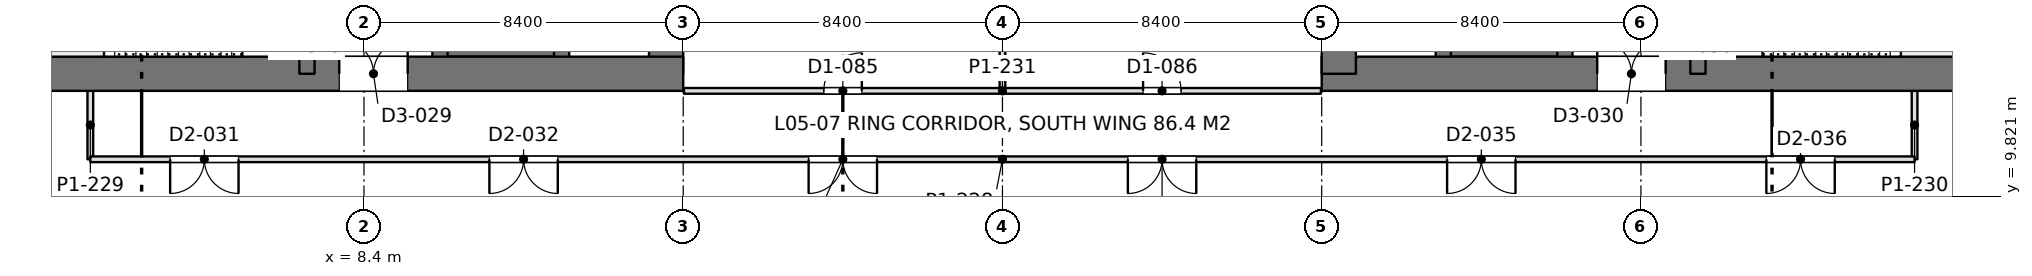
"""IFC4 building model, lengths in metres.
Left out: names, types, materials, properties, quantities, classifications, styles, units other than length and angle.
Written with IfcOpenShell. Run it as: python <this file> out.ifc"""

import sys

from ifc_helpers import new_model, si_unit, direction, frame, frame_2d, origin, place, context, subcontext, project, spatial, rectangle, extrude, element, fill, save


model = new_model("IFC4")
c1 = context("Model", 3, precision=1e-05, world=origin(), true_north=direction((0.0, 1.0)))
c2 = subcontext(c1, "Body", "Model", "MODEL_VIEW")
j1 = project(units=[si_unit("LENGTHUNIT", "METRE"), si_unit("PLANEANGLEUNIT", "RADIAN")], contexts=[c1])
p1 = place(None, origin())
s1 = spatial("IfcSite", under=j1, at=p1, CompositionType="ELEMENT")
p2 = place(p1, origin())
s2 = spatial("IfcBuilding", under=s1, at=p2, CompositionType="ELEMENT")
p3 = place(p2, frame((0.0, 0.0, 23.4)))
s3 = spatial("IfcBuildingStorey", under=s2, at=p3, CompositionType="ELEMENT", Elevation=23.4)
p4 = place(p3, frame((-1.2, 13.05, 0.0), z_axis=(0.0, 0.0, 1.0), x_axis=(1.0, 0.0, 0.0)))
e1 = element("IfcWall", 1, at=p4, inside=s3, PredefinedType="SHEAR", context=c2, shape_type="SweptSolid", body=[
    extrude(rectangle(XDim=18.0, YDim=0.9, at=frame_2d((9.0, 0.0))), origin(), (0.0, 0.0, 1.0), 4.5),
])
p5 = place(p4, frame((8.95, 0.0, 0.0)))
e2 = element("IfcOpeningElement", 2, at=p5, cuts=e1, PredefinedType="OPENING", context=c2, shape_type="SweptSolid", body=[
    extrude(rectangle(XDim=1.8, YDim=2.4, at=frame_2d((0.9, 1.2))), frame((0.0, 0.46, 0.0), z_axis=(0.0, -1.0, 0.0), x_axis=(1.0, 0.0, 0.0)), (0.0, 0.0, 1.0), 0.92),
])
p6 = place(p3, frame((16.35, 13.05, 0.0), z_axis=(0.0, 0.0, 1.0), x_axis=(0.0, 1.0, 0.0)))
e3 = element("IfcWall", 3, at=p6, inside=s3, PredefinedType="SHEAR", context=c2, shape_type="SweptSolid", body=[
    extrude(rectangle(XDim=24.3, YDim=0.9, at=frame_2d((12.15, 0.0))), origin(), (0.0, 0.0, 1.0), 4.5),
])
p7 = place(p3, frame((6.9, 13.05, 0.0), z_axis=(0.0, 0.0, 1.0), x_axis=(0.0, 1.0, 0.0)))
e4 = element("IfcWall", 4, at=p7, inside=s3, PredefinedType="SHEAR", context=c2, shape_type="SweptSolid", body=[
    extrude(rectangle(XDim=24.3, YDim=0.4, at=frame_2d((12.15, 0.0))), origin(), (0.0, 0.0, 1.0), 4.5),
])
p8 = place(p7, frame((1.3, 0.0, 0.0)))
e5 = element("IfcOpeningElement", 5, at=p8, cuts=e4, PredefinedType="OPENING", context=c2, shape_type="SweptSolid", body=[
    extrude(rectangle(XDim=1.0, YDim=2.2, at=frame_2d((0.5, 1.1))), frame((0.0, 0.21, 0.0), z_axis=(0.0, -1.0, 0.0), x_axis=(1.0, 0.0, 0.0)), (0.0, 0.0, 1.0), 0.42),
])
p9 = place(p7, frame((22.0, 0.0, 0.0)))
e6 = element("IfcOpeningElement", 6, at=p9, cuts=e4, PredefinedType="OPENING", context=c2, shape_type="SweptSolid", body=[
    extrude(rectangle(XDim=1.0, YDim=2.2, at=frame_2d((0.5, 1.1))), frame((0.0, 0.21, 0.0), z_axis=(0.0, -1.0, 0.0), x_axis=(1.0, 0.0, 0.0)), (0.0, 0.0, 1.0), 0.42),
])
p10 = place(p7, frame((5.55, 0.0, 0.0)))
e7 = element("IfcOpeningElement", 7, at=p10, cuts=e4, PredefinedType="OPENING", context=c2, shape_type="SweptSolid", body=[
    extrude(rectangle(XDim=1.0, YDim=2.2, at=frame_2d((0.5, 1.1))), frame((0.0, 0.21, 0.0), z_axis=(0.0, -1.0, 0.0), x_axis=(1.0, 0.0, 0.0)), (0.0, 0.0, 1.0), 0.42),
])
p11 = place(p7, frame((9.55, 0.0, 0.0)))
e8 = element("IfcOpeningElement", 8, at=p11, cuts=e4, PredefinedType="OPENING", context=c2, shape_type="SweptSolid", body=[
    extrude(rectangle(XDim=1.0, YDim=2.2, at=frame_2d((0.5, 1.1))), frame((0.0, 0.21, 0.0), z_axis=(0.0, -1.0, 0.0), x_axis=(1.0, 0.0, 0.0)), (0.0, 0.0, 1.0), 0.42),
])
p12 = place(p7, frame((12.8, 0.0, 0.0)))
e9 = element("IfcOpeningElement", 9, at=p12, cuts=e4, PredefinedType="OPENING", context=c2, shape_type="SweptSolid", body=[
    extrude(rectangle(XDim=1.1, YDim=2.2, at=frame_2d((0.55, 1.1))), frame((0.0, 0.21, 0.0), z_axis=(0.0, -1.0, 0.0), x_axis=(1.0, 0.0, 0.0)), (0.0, 0.0, 1.0), 0.42),
])
p13 = place(p7, frame((15.538, 0.0, 0.0)))
e10 = element("IfcOpeningElement", 10, at=p13, cuts=e4, PredefinedType="OPENING", context=c2, shape_type="SweptSolid", body=[
    extrude(rectangle(XDim=1.1, YDim=2.2, at=frame_2d((0.55, 1.1))), frame((0.0, 0.21, 0.0), z_axis=(0.0, -1.0, 0.0), x_axis=(1.0, 0.0, 0.0)), (0.0, 0.0, 1.0), 0.42),
])
p14 = place(p7, frame((18.262, 0.0, 0.0)))
e11 = element("IfcOpeningElement", 11, at=p14, cuts=e4, PredefinedType="OPENING", context=c2, shape_type="SweptSolid", body=[
    extrude(rectangle(XDim=1.1, YDim=2.2, at=frame_2d((0.55, 1.1))), frame((0.0, 0.21, 0.0), z_axis=(0.0, -1.0, 0.0), x_axis=(1.0, 0.0, 0.0)), (0.0, 0.0, 1.0), 0.42),
])
p15 = place(p3, frame((10.4, 13.05, 0.0), z_axis=(0.0, 0.0, 1.0), x_axis=(0.0, 1.0, 0.0)))
e12 = element("IfcWall", 12, at=p15, inside=s3, PredefinedType="SHEAR", context=c2, shape_type="SweptSolid", body=[
    extrude(rectangle(XDim=24.3, YDim=0.4, at=frame_2d((12.15, 0.0))), origin(), (0.0, 0.0, 1.0), 4.5),
])
p16 = place(p15, frame((1.5, 0.0, 0.0)))
e13 = element("IfcOpeningElement", 13, at=p16, cuts=e12, PredefinedType="OPENING", context=c2, shape_type="SweptSolid", body=[
    extrude(rectangle(XDim=1.1, YDim=2.2, at=frame_2d((0.55, 1.1))), frame((0.0, 0.21, 0.0), z_axis=(0.0, -1.0, 0.0), x_axis=(1.0, 0.0, 0.0)), (0.0, 0.0, 1.0), 0.42),
])
p17 = place(p15, frame((4.35, 0.0, 0.0)))
e14 = element("IfcOpeningElement", 14, at=p17, cuts=e12, PredefinedType="OPENING", context=c2, shape_type="SweptSolid", body=[
    extrude(rectangle(XDim=1.1, YDim=2.2, at=frame_2d((0.55, 1.1))), frame((0.0, 0.21, 0.0), z_axis=(0.0, -1.0, 0.0), x_axis=(1.0, 0.0, 0.0)), (0.0, 0.0, 1.0), 0.42),
])
p18 = place(p15, frame((7.2, 0.0, 0.0)))
e15 = element("IfcOpeningElement", 15, at=p18, cuts=e12, PredefinedType="OPENING", context=c2, shape_type="SweptSolid", body=[
    extrude(rectangle(XDim=1.1, YDim=2.2, at=frame_2d((0.55, 1.1))), frame((0.0, 0.21, 0.0), z_axis=(0.0, -1.0, 0.0), x_axis=(1.0, 0.0, 0.0)), (0.0, 0.0, 1.0), 0.42),
])
p19 = place(p15, frame((21.45, 0.0, 0.0)))
e16 = element("IfcOpeningElement", 16, at=p19, cuts=e12, PredefinedType="OPENING", context=c2, shape_type="SweptSolid", body=[
    extrude(rectangle(XDim=1.1, YDim=2.2, at=frame_2d((0.55, 1.1))), frame((0.0, 0.21, 0.0), z_axis=(0.0, -1.0, 0.0), x_axis=(1.0, 0.0, 0.0)), (0.0, 0.0, 1.0), 0.42),
])
p20 = place(p3, frame((13.6, 13.05, 0.0), z_axis=(0.0, 0.0, 1.0), x_axis=(0.0, 1.0, 0.0)))
e17 = element("IfcWall", 17, at=p20, inside=s3, PredefinedType="SHEAR", context=c2, shape_type="SweptSolid", body=[
    extrude(rectangle(XDim=24.3, YDim=0.4, at=frame_2d((12.15, 0.0))), origin(), (0.0, 0.0, 1.0), 4.5),
])
p21 = place(p3, frame((10.4, 13.65, 0.0), z_axis=(0.0, 0.0, 1.0), x_axis=(1.0, 0.0, 0.0)))
e18 = element("IfcWall", 18, at=p21, inside=s3, PredefinedType="SHEAR", context=c2, shape_type="SweptSolid", body=[
    extrude(rectangle(XDim=3.2, YDim=0.3, at=frame_2d((1.6, 0.0))), origin(), (0.0, 0.0, 1.0), 4.5),
])
p22 = place(p3, frame((33.6, 13.05, 0.0), z_axis=(0.0, 0.0, 1.0), x_axis=(1.0, 0.0, 0.0)))
e19 = element("IfcWall", 19, at=p22, inside=s3, PredefinedType="SHEAR", context=c2, shape_type="SweptSolid", body=[
    extrude(rectangle(XDim=18.0, YDim=0.9, at=frame_2d((9.0, 0.0))), origin(), (0.0, 0.0, 1.0), 4.5),
])
p23 = place(p22, frame((7.25, 0.0, 0.0)))
e20 = element("IfcOpeningElement", 20, at=p23, cuts=e19, PredefinedType="OPENING", context=c2, shape_type="SweptSolid", body=[
    extrude(rectangle(XDim=1.8, YDim=2.4, at=frame_2d((0.9, 1.2))), frame((0.0, 0.46, 0.0), z_axis=(0.0, -1.0, 0.0), x_axis=(1.0, 0.0, 0.0)), (0.0, 0.0, 1.0), 0.92),
])
p24 = place(p3, frame((34.05, 13.05, 0.0), z_axis=(0.0, 0.0, 1.0), x_axis=(0.0, 1.0, 0.0)))
e21 = element("IfcWall", 21, at=p24, inside=s3, PredefinedType="SHEAR", context=c2, shape_type="SweptSolid", body=[
    extrude(rectangle(XDim=24.3, YDim=0.9, at=frame_2d((12.15, 0.0))), origin(), (0.0, 0.0, 1.0), 4.5),
])
p25 = place(p3, frame((43.5, 13.05, 0.0), z_axis=(0.0, 0.0, 1.0), x_axis=(0.0, 1.0, 0.0)))
e22 = element("IfcWall", 22, at=p25, inside=s3, PredefinedType="SHEAR", context=c2, shape_type="SweptSolid", body=[
    extrude(rectangle(XDim=24.3, YDim=0.4, at=frame_2d((12.15, 0.0))), origin(), (0.0, 0.0, 1.0), 4.5),
])
p26 = place(p25, frame((1.3, 0.0, 0.0)))
e23 = element("IfcOpeningElement", 23, at=p26, cuts=e22, PredefinedType="OPENING", context=c2, shape_type="SweptSolid", body=[
    extrude(rectangle(XDim=1.0, YDim=2.2, at=frame_2d((0.5, 1.1))), frame((0.0, 0.21, 0.0), z_axis=(0.0, -1.0, 0.0), x_axis=(1.0, 0.0, 0.0)), (0.0, 0.0, 1.0), 0.42),
])
p27 = place(p25, frame((22.0, 0.0, 0.0)))
e24 = element("IfcOpeningElement", 24, at=p27, cuts=e22, PredefinedType="OPENING", context=c2, shape_type="SweptSolid", body=[
    extrude(rectangle(XDim=1.0, YDim=2.2, at=frame_2d((0.5, 1.1))), frame((0.0, 0.21, 0.0), z_axis=(0.0, -1.0, 0.0), x_axis=(1.0, 0.0, 0.0)), (0.0, 0.0, 1.0), 0.42),
])
p28 = place(p25, frame((5.55, 0.0, 0.0)))
e25 = element("IfcOpeningElement", 25, at=p28, cuts=e22, PredefinedType="OPENING", context=c2, shape_type="SweptSolid", body=[
    extrude(rectangle(XDim=1.0, YDim=2.2, at=frame_2d((0.5, 1.1))), frame((0.0, 0.21, 0.0), z_axis=(0.0, -1.0, 0.0), x_axis=(1.0, 0.0, 0.0)), (0.0, 0.0, 1.0), 0.42),
])
p29 = place(p25, frame((9.55, 0.0, 0.0)))
e26 = element("IfcOpeningElement", 26, at=p29, cuts=e22, PredefinedType="OPENING", context=c2, shape_type="SweptSolid", body=[
    extrude(rectangle(XDim=1.0, YDim=2.2, at=frame_2d((0.5, 1.1))), frame((0.0, 0.21, 0.0), z_axis=(0.0, -1.0, 0.0), x_axis=(1.0, 0.0, 0.0)), (0.0, 0.0, 1.0), 0.42),
])
p30 = place(p25, frame((12.8, 0.0, 0.0)))
e27 = element("IfcOpeningElement", 27, at=p30, cuts=e22, PredefinedType="OPENING", context=c2, shape_type="SweptSolid", body=[
    extrude(rectangle(XDim=1.1, YDim=2.2, at=frame_2d((0.55, 1.1))), frame((0.0, 0.21, 0.0), z_axis=(0.0, -1.0, 0.0), x_axis=(1.0, 0.0, 0.0)), (0.0, 0.0, 1.0), 0.42),
])
p31 = place(p25, frame((15.538, 0.0, 0.0)))
e28 = element("IfcOpeningElement", 28, at=p31, cuts=e22, PredefinedType="OPENING", context=c2, shape_type="SweptSolid", body=[
    extrude(rectangle(XDim=1.1, YDim=2.2, at=frame_2d((0.55, 1.1))), frame((0.0, 0.21, 0.0), z_axis=(0.0, -1.0, 0.0), x_axis=(1.0, 0.0, 0.0)), (0.0, 0.0, 1.0), 0.42),
])
p32 = place(p25, frame((18.262, 0.0, 0.0)))
e29 = element("IfcOpeningElement", 29, at=p32, cuts=e22, PredefinedType="OPENING", context=c2, shape_type="SweptSolid", body=[
    extrude(rectangle(XDim=1.1, YDim=2.2, at=frame_2d((0.55, 1.1))), frame((0.0, 0.21, 0.0), z_axis=(0.0, -1.0, 0.0), x_axis=(1.0, 0.0, 0.0)), (0.0, 0.0, 1.0), 0.42),
])
p33 = place(p3, frame((40.0, 13.05, 0.0), z_axis=(0.0, 0.0, 1.0), x_axis=(0.0, 1.0, 0.0)))
e30 = element("IfcWall", 30, at=p33, inside=s3, PredefinedType="SHEAR", context=c2, shape_type="SweptSolid", body=[
    extrude(rectangle(XDim=24.3, YDim=0.4, at=frame_2d((12.15, 0.0))), origin(), (0.0, 0.0, 1.0), 4.5),
])
p34 = place(p33, frame((1.5, 0.0, 0.0)))
e31 = element("IfcOpeningElement", 31, at=p34, cuts=e30, PredefinedType="OPENING", context=c2, shape_type="SweptSolid", body=[
    extrude(rectangle(XDim=1.1, YDim=2.2, at=frame_2d((0.55, 1.1))), frame((0.0, 0.21, 0.0), z_axis=(0.0, -1.0, 0.0), x_axis=(1.0, 0.0, 0.0)), (0.0, 0.0, 1.0), 0.42),
])
p35 = place(p33, frame((4.35, 0.0, 0.0)))
e32 = element("IfcOpeningElement", 32, at=p35, cuts=e30, PredefinedType="OPENING", context=c2, shape_type="SweptSolid", body=[
    extrude(rectangle(XDim=1.1, YDim=2.2, at=frame_2d((0.55, 1.1))), frame((0.0, 0.21, 0.0), z_axis=(0.0, -1.0, 0.0), x_axis=(1.0, 0.0, 0.0)), (0.0, 0.0, 1.0), 0.42),
])
p36 = place(p33, frame((7.2, 0.0, 0.0)))
e33 = element("IfcOpeningElement", 33, at=p36, cuts=e30, PredefinedType="OPENING", context=c2, shape_type="SweptSolid", body=[
    extrude(rectangle(XDim=1.1, YDim=2.2, at=frame_2d((0.55, 1.1))), frame((0.0, 0.21, 0.0), z_axis=(0.0, -1.0, 0.0), x_axis=(1.0, 0.0, 0.0)), (0.0, 0.0, 1.0), 0.42),
])
p37 = place(p33, frame((21.45, 0.0, 0.0)))
e34 = element("IfcOpeningElement", 34, at=p37, cuts=e30, PredefinedType="OPENING", context=c2, shape_type="SweptSolid", body=[
    extrude(rectangle(XDim=1.1, YDim=2.2, at=frame_2d((0.55, 1.1))), frame((0.0, 0.21, 0.0), z_axis=(0.0, -1.0, 0.0), x_axis=(1.0, 0.0, 0.0)), (0.0, 0.0, 1.0), 0.42),
])
p38 = place(p3, frame((36.8, 13.05, 0.0), z_axis=(0.0, 0.0, 1.0), x_axis=(0.0, 1.0, 0.0)))
e35 = element("IfcWall", 35, at=p38, inside=s3, PredefinedType="SHEAR", context=c2, shape_type="SweptSolid", body=[
    extrude(rectangle(XDim=24.3, YDim=0.4, at=frame_2d((12.15, 0.0))), origin(), (0.0, 0.0, 1.0), 4.5),
])
p39 = place(p3, frame((40.0, 13.65, 0.0), z_axis=(0.0, 0.0, 1.0), x_axis=(-1.0, 0.0, 0.0)))
e36 = element("IfcWall", 36, at=p39, inside=s3, PredefinedType="SHEAR", context=c2, shape_type="SweptSolid", body=[
    extrude(rectangle(XDim=3.2, YDim=0.3, at=frame_2d((1.6, 0.0))), origin(), (0.0, 0.0, 1.0), 4.5),
])
p40 = place(p3, frame((1.2, 10.8, 0.0), z_axis=(0.0, 0.0, 1.0), x_axis=(1.0, 0.0, 0.0)))
e37 = element("IfcWall", 37, at=p40, inside=s3, PredefinedType="PARTITIONING", context=c2, shape_type="SweptSolid", body=[
    extrude(rectangle(XDim=48.0, YDim=0.15, at=frame_2d((24.0, 0.0))), origin(), (0.0, 0.0, 1.0), 3.74),
])
p41 = place(p40, frame((2.1, 0.0, 0.0)))
e38 = element("IfcOpeningElement", 38, at=p41, cuts=e37, PredefinedType="OPENING", context=c2, shape_type="SweptSolid", body=[
    extrude(rectangle(XDim=1.8, YDim=2.2, at=frame_2d((0.9, 1.1))), frame((0.0, 0.085, 0.0), z_axis=(0.0, -1.0, 0.0), x_axis=(1.0, 0.0, 0.0)), (0.0, 0.0, 1.0), 0.17),
])
p42 = place(p40, frame((10.5, 0.0, 0.0)))
e39 = element("IfcOpeningElement", 39, at=p42, cuts=e37, PredefinedType="OPENING", context=c2, shape_type="SweptSolid", body=[
    extrude(rectangle(XDim=1.8, YDim=2.2, at=frame_2d((0.9, 1.1))), frame((0.0, 0.085, 0.0), z_axis=(0.0, -1.0, 0.0), x_axis=(1.0, 0.0, 0.0)), (0.0, 0.0, 1.0), 0.17),
])
p43 = place(p40, frame((18.9, 0.0, 0.0)))
e40 = element("IfcOpeningElement", 40, at=p43, cuts=e37, PredefinedType="OPENING", context=c2, shape_type="SweptSolid", body=[
    extrude(rectangle(XDim=1.8, YDim=2.2, at=frame_2d((0.9, 1.1))), frame((0.0, 0.085, 0.0), z_axis=(0.0, -1.0, 0.0), x_axis=(1.0, 0.0, 0.0)), (0.0, 0.0, 1.0), 0.17),
])
p44 = place(p40, frame((27.3, 0.0, 0.0)))
e41 = element("IfcOpeningElement", 41, at=p44, cuts=e37, PredefinedType="OPENING", context=c2, shape_type="SweptSolid", body=[
    extrude(rectangle(XDim=1.8, YDim=2.2, at=frame_2d((0.9, 1.1))), frame((0.0, 0.085, 0.0), z_axis=(0.0, -1.0, 0.0), x_axis=(1.0, 0.0, 0.0)), (0.0, 0.0, 1.0), 0.17),
])
p45 = place(p40, frame((35.7, 0.0, 0.0)))
e42 = element("IfcOpeningElement", 42, at=p45, cuts=e37, PredefinedType="OPENING", context=c2, shape_type="SweptSolid", body=[
    extrude(rectangle(XDim=1.8, YDim=2.2, at=frame_2d((0.9, 1.1))), frame((0.0, 0.085, 0.0), z_axis=(0.0, -1.0, 0.0), x_axis=(1.0, 0.0, 0.0)), (0.0, 0.0, 1.0), 0.17),
])
p46 = place(p40, frame((44.1, 0.0, 0.0)))
e43 = element("IfcOpeningElement", 43, at=p46, cuts=e37, PredefinedType="OPENING", context=c2, shape_type="SweptSolid", body=[
    extrude(rectangle(XDim=1.8, YDim=2.2, at=frame_2d((0.9, 1.1))), frame((0.0, 0.085, 0.0), z_axis=(0.0, -1.0, 0.0), x_axis=(1.0, 0.0, 0.0)), (0.0, 0.0, 1.0), 0.17),
])
for number, where, z_axis, x_axis in (
    (44, (1.2, 10.8, 0.0), (0.0, 0.0, 1.0), (0.0, 1.0, 0.0)),
    (45, (49.2, 10.8, 0.0), (0.0, 0.0, 1.0), (0.0, 1.0, 0.0)),
):
    element("IfcWall", number, at=place(p3, frame(where, z_axis=z_axis, x_axis=x_axis)), inside=s3, PredefinedType="PARTITIONING", context=c2, shape_type="SweptSolid", body=[
        extrude(rectangle(XDim=1.802, YDim=0.15, at=frame_2d((0.901, 0.0))), origin(), (0.0, 0.0, 1.0), 4.34),
    ])
p47 = place(p3, frame((25.2, 12.674, 0.0), z_axis=(0.0, 0.0, 1.0), x_axis=(0.0, 1.0, 0.0)))
e46 = element("IfcWall", 46, at=p47, inside=s3, PredefinedType="PARTITIONING", context=c2, shape_type="SweptSolid", body=[
    extrude(rectangle(XDim=3.527, YDim=0.15, at=frame_2d((1.763, 0.0))), origin(), (0.0, 0.0, 1.0), 3.74),
])
p48 = place(p3, frame((16.82, 12.6, 0.0), z_axis=(0.0, 0.0, 1.0), x_axis=(1.0, 0.0, 0.0)))
e47 = element("IfcWall", 47, at=p48, inside=s3, PredefinedType="PARTITIONING", context=c2, shape_type="SweptSolid", body=[
    extrude(rectangle(XDim=16.76, YDim=0.15, at=frame_2d((8.38, 0.0))), origin(), (0.0, 0.0, 1.0), 3.74),
])
p49 = place(p48, frame((3.68, 0.0, 0.0)))
e48 = element("IfcOpeningElement", 48, at=p49, cuts=e47, PredefinedType="OPENING", context=c2, shape_type="SweptSolid", body=[
    extrude(rectangle(XDim=1.0, YDim=2.2, at=frame_2d((0.5, 1.1))), frame((0.0, 0.085, 0.0), z_axis=(0.0, -1.0, 0.0), x_axis=(1.0, 0.0, 0.0)), (0.0, 0.0, 1.0), 0.17),
])
p50 = place(p48, frame((12.08, 0.0, 0.0)))
e49 = element("IfcOpeningElement", 49, at=p50, cuts=e47, PredefinedType="OPENING", context=c2, shape_type="SweptSolid", body=[
    extrude(rectangle(XDim=1.0, YDim=2.2, at=frame_2d((0.5, 1.1))), frame((0.0, 0.085, 0.0), z_axis=(0.0, -1.0, 0.0), x_axis=(1.0, 0.0, 0.0)), (0.0, 0.0, 1.0), 0.17),
])
p51 = place(p5, origin())
e50 = element("IfcDoor", 50, at=p51, inside=s3, OperationType="DOUBLE_DOOR_SINGLE_SWING", PredefinedType="DOOR", context=c2, shape_type="SweptSolid", body=[
    extrude(rectangle(XDim=1.8, YDim=2.4, at=frame_2d((0.9, 1.2))), frame((0.0, 0.025, 0.0), z_axis=(0.0, -1.0, 0.0), x_axis=(1.0, 0.0, 0.0)), (0.0, 0.0, 1.0), 0.05),
])
fill(e2, e50)
p52 = place(p23, origin())
e51 = element("IfcDoor", 51, at=p52, inside=s3, OperationType="DOUBLE_DOOR_SINGLE_SWING", PredefinedType="DOOR", context=c2, shape_type="SweptSolid", body=[
    extrude(rectangle(XDim=1.8, YDim=2.4, at=frame_2d((0.9, 1.2))), frame((0.0, 0.025, 0.0), z_axis=(0.0, -1.0, 0.0), x_axis=(1.0, 0.0, 0.0)), (0.0, 0.0, 1.0), 0.05),
])
fill(e20, e51)
p53 = place(p41, frame((1.8, 0.0, 0.0), z_axis=(0.0, 0.0, 1.0), x_axis=(-1.0, 0.0, 0.0)))
e52 = element("IfcDoor", 52, at=p53, inside=s3, OperationType="DOUBLE_DOOR_SINGLE_SWING", PredefinedType="DOOR", context=c2, shape_type="SweptSolid", body=[
    extrude(rectangle(XDim=1.8, YDim=2.2, at=frame_2d((0.9, 1.1))), frame((0.0, 0.025, 0.0), z_axis=(0.0, -1.0, 0.0), x_axis=(1.0, 0.0, 0.0)), (0.0, 0.0, 1.0), 0.05),
])
fill(e38, e52)
p54 = place(p42, frame((1.8, 0.0, 0.0), z_axis=(0.0, 0.0, 1.0), x_axis=(-1.0, 0.0, 0.0)))
e53 = element("IfcDoor", 53, at=p54, inside=s3, OperationType="DOUBLE_DOOR_SINGLE_SWING", PredefinedType="DOOR", context=c2, shape_type="SweptSolid", body=[
    extrude(rectangle(XDim=1.8, YDim=2.2, at=frame_2d((0.9, 1.1))), frame((0.0, 0.025, 0.0), z_axis=(0.0, -1.0, 0.0), x_axis=(1.0, 0.0, 0.0)), (0.0, 0.0, 1.0), 0.05),
])
fill(e39, e53)
p55 = place(p43, frame((1.8, 0.0, 0.0), z_axis=(0.0, 0.0, 1.0), x_axis=(-1.0, 0.0, 0.0)))
e54 = element("IfcDoor", 54, at=p55, inside=s3, OperationType="DOUBLE_DOOR_SINGLE_SWING", PredefinedType="DOOR", context=c2, shape_type="SweptSolid", body=[
    extrude(rectangle(XDim=1.8, YDim=2.2, at=frame_2d((0.9, 1.1))), frame((0.0, 0.025, 0.0), z_axis=(0.0, -1.0, 0.0), x_axis=(1.0, 0.0, 0.0)), (0.0, 0.0, 1.0), 0.05),
])
fill(e40, e54)
p56 = place(p44, frame((1.8, 0.0, 0.0), z_axis=(0.0, 0.0, 1.0), x_axis=(-1.0, 0.0, 0.0)))
e55 = element("IfcDoor", 55, at=p56, inside=s3, OperationType="DOUBLE_DOOR_SINGLE_SWING", PredefinedType="DOOR", context=c2, shape_type="SweptSolid", body=[
    extrude(rectangle(XDim=1.8, YDim=2.2, at=frame_2d((0.9, 1.1))), frame((0.0, 0.025, 0.0), z_axis=(0.0, -1.0, 0.0), x_axis=(1.0, 0.0, 0.0)), (0.0, 0.0, 1.0), 0.05),
])
fill(e41, e55)
p57 = place(p45, frame((1.8, 0.0, 0.0), z_axis=(0.0, 0.0, 1.0), x_axis=(-1.0, 0.0, 0.0)))
e56 = element("IfcDoor", 56, at=p57, inside=s3, OperationType="DOUBLE_DOOR_SINGLE_SWING", PredefinedType="DOOR", context=c2, shape_type="SweptSolid", body=[
    extrude(rectangle(XDim=1.8, YDim=2.2, at=frame_2d((0.9, 1.1))), frame((0.0, 0.025, 0.0), z_axis=(0.0, -1.0, 0.0), x_axis=(1.0, 0.0, 0.0)), (0.0, 0.0, 1.0), 0.05),
])
fill(e42, e56)
p58 = place(p46, frame((1.8, 0.0, 0.0), z_axis=(0.0, 0.0, 1.0), x_axis=(-1.0, 0.0, 0.0)))
e57 = element("IfcDoor", 57, at=p58, inside=s3, OperationType="DOUBLE_DOOR_SINGLE_SWING", PredefinedType="DOOR", context=c2, shape_type="SweptSolid", body=[
    extrude(rectangle(XDim=1.8, YDim=2.2, at=frame_2d((0.9, 1.1))), frame((0.0, 0.025, 0.0), z_axis=(0.0, -1.0, 0.0), x_axis=(1.0, 0.0, 0.0)), (0.0, 0.0, 1.0), 0.05),
])
fill(e43, e57)
p59 = place(p49, origin())
e58 = element("IfcDoor", 58, at=p59, inside=s3, OperationType="SINGLE_SWING_RIGHT", PredefinedType="DOOR", context=c2, shape_type="SweptSolid", body=[
    extrude(rectangle(XDim=1.0, YDim=2.2, at=frame_2d((0.5, 1.1))), frame((0.0, 0.025, 0.0), z_axis=(0.0, -1.0, 0.0), x_axis=(1.0, 0.0, 0.0)), (0.0, 0.0, 1.0), 0.05),
])
fill(e48, e58)
p60 = place(p50, origin())
e59 = element("IfcDoor", 59, at=p60, inside=s3, OperationType="SINGLE_SWING_LEFT", PredefinedType="DOOR", context=c2, shape_type="SweptSolid", body=[
    extrude(rectangle(XDim=1.0, YDim=2.2, at=frame_2d((0.5, 1.1))), frame((0.0, 0.025, 0.0), z_axis=(0.0, -1.0, 0.0), x_axis=(1.0, 0.0, 0.0)), (0.0, 0.0, 1.0), 0.05),
])
fill(e49, e59)
save(model, sys.argv[1])
